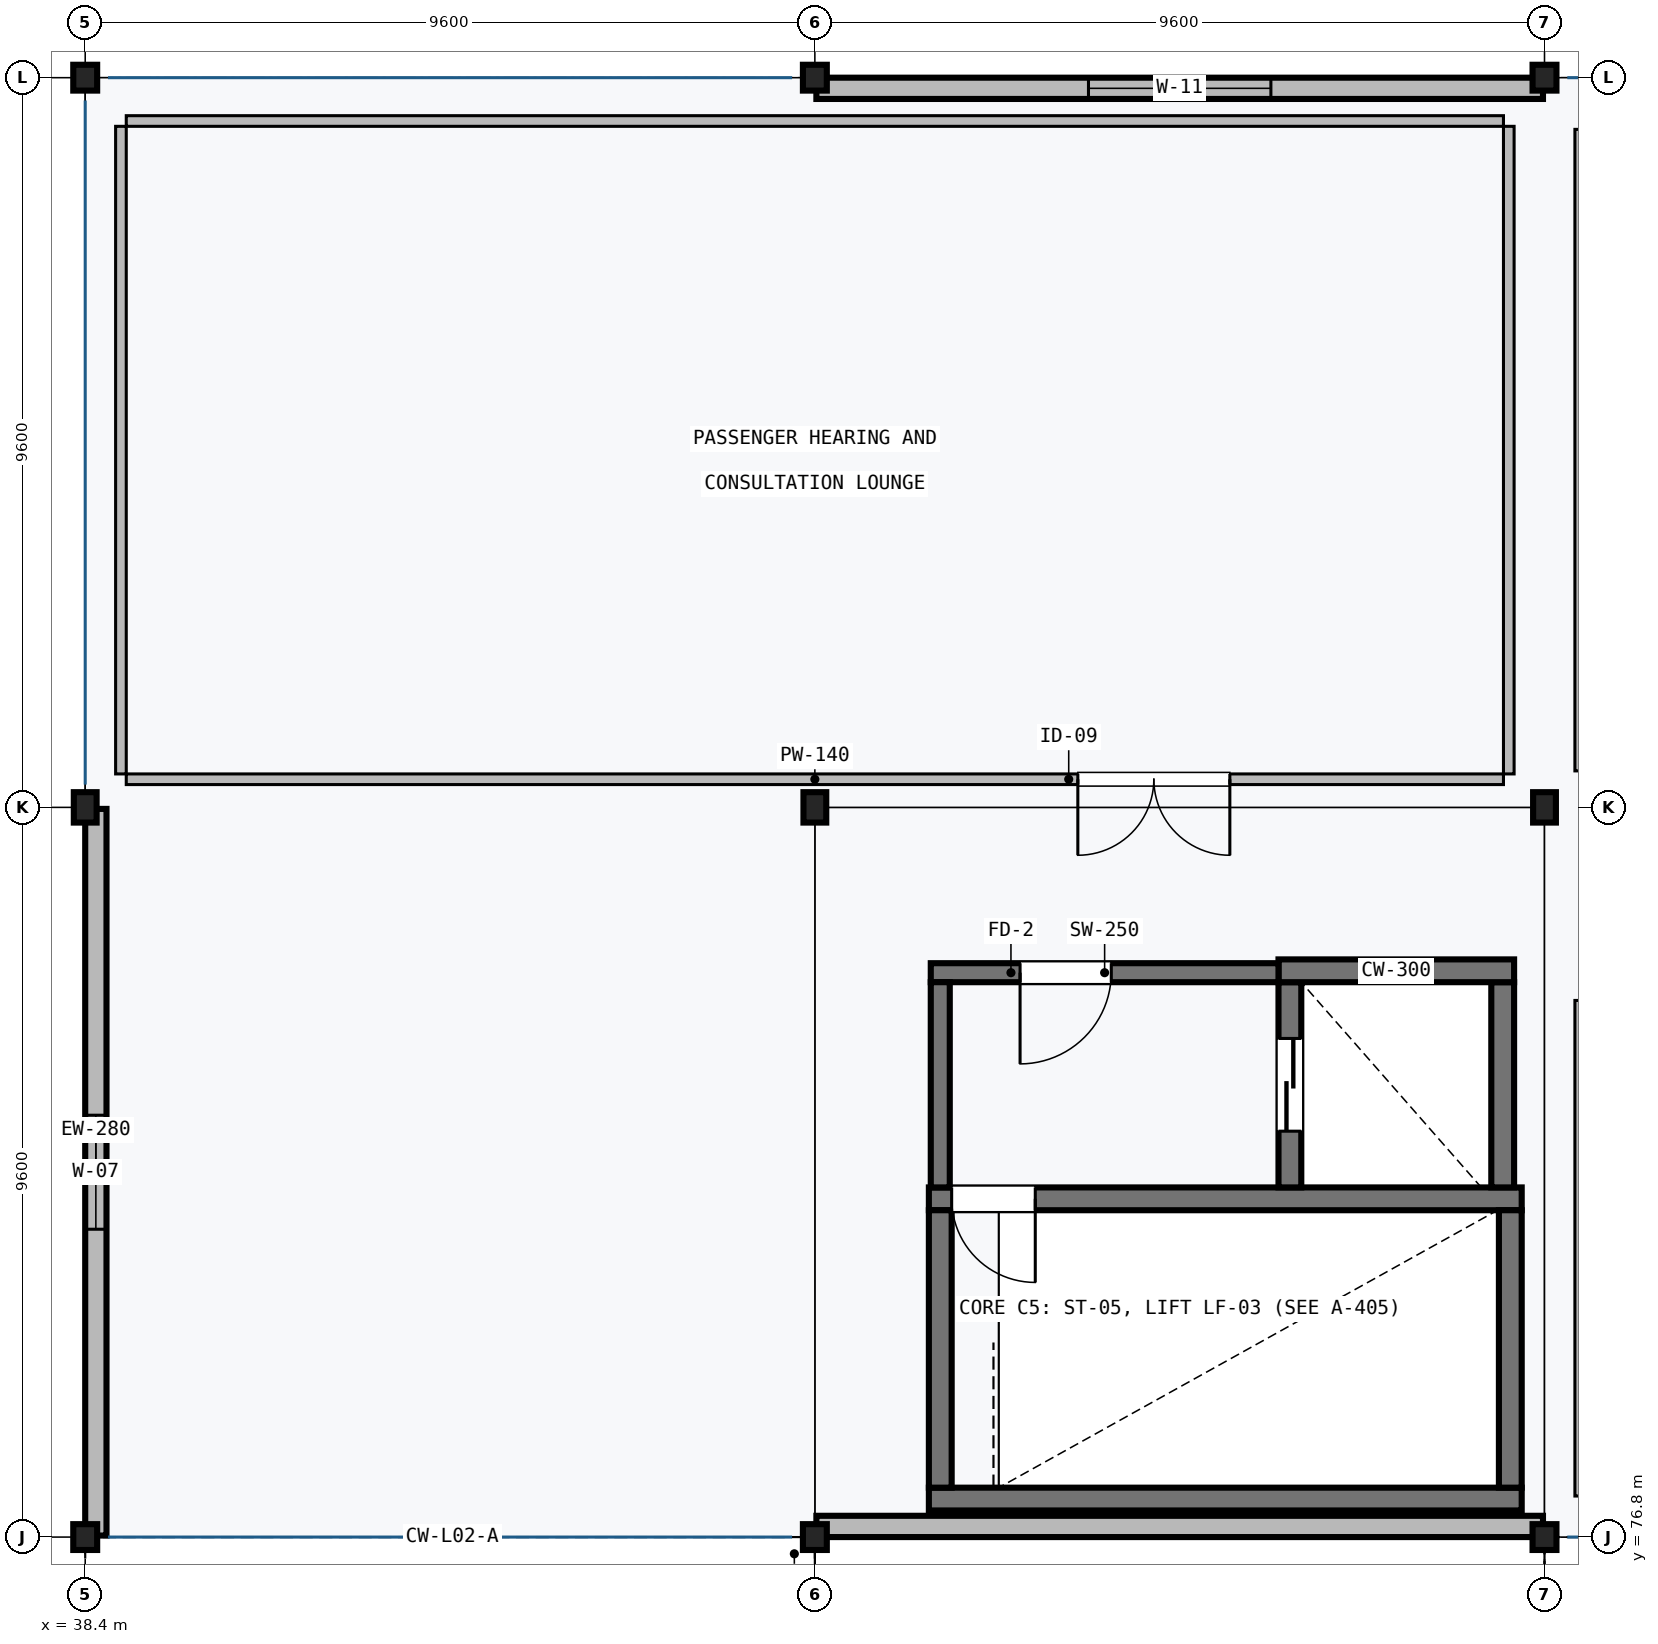
"""IFC4 building model, lengths in metres.
Left out: names, types, materials, properties, quantities, classifications, styles, units other than length and angle.
Written with IfcOpenShell. Run it as: python <this file> out.ifc"""

import sys

from ifc_helpers import new_model, si_unit, direction, frame, frame_2d, origin, origin_2d, place, context, subcontext, project, spatial, rectangle, i_section, extrude, element, fill, save


model = new_model("IFC4")
c1 = context("Model", 3, precision=1e-05, world=origin(), true_north=direction((0.0, 1.0)))
c2 = subcontext(c1, "Body", "Model", "MODEL_VIEW")
j1 = project(units=[si_unit("LENGTHUNIT", "METRE"), si_unit("PLANEANGLEUNIT", "RADIAN")], contexts=[c1])
p1 = place(None, origin())
s1 = spatial("IfcSite", under=j1, at=p1, CompositionType="ELEMENT")
p2 = place(p1, origin())
s2 = spatial("IfcBuilding", under=s1, at=p2, CompositionType="ELEMENT")
p3 = place(p2, frame((0.0, 0.0, 10.5)))
s3 = spatial("IfcBuildingStorey", under=s2, at=p3, CompositionType="ELEMENT", Elevation=10.5)
p4 = place(p3, frame((38.4, 76.8, 0.0), z_axis=(0.0, 0.0, 1.0), x_axis=(1.0, 0.0, 0.0)))
e1 = element("IfcColumn", 1, at=p4, inside=s3, PredefinedType="COLUMN", context=c2, shape_type="SweptSolid", body=[
    extrude(i_section(OverallWidth=0.314, OverallDepth=0.34, WebThickness=0.019, FlangeThickness=0.031, FilletRadius=0.015, at=origin_2d()), origin(), (0.0, 0.0, 1.0), 3.95),
])
p5 = place(p3, frame((38.4, 86.4, 0.0), z_axis=(0.0, 0.0, 1.0), x_axis=(1.0, 0.0, 0.0)))
e2 = element("IfcColumn", 2, at=p5, inside=s3, PredefinedType="COLUMN", context=c2, shape_type="SweptSolid", body=[
    extrude(i_section(OverallWidth=0.3, OverallDepth=0.4, WebThickness=0.013, FlangeThickness=0.024, FilletRadius=0.027, at=origin_2d()), origin(), (0.0, 0.0, 1.0), 3.95),
])
for number, where, z_axis, x_axis in (
    (3, (38.4, 96.0, 0.0), (0.0, 0.0, 1.0), (1.0, 0.0, 0.0)),
    (4, (48.0, 76.8, 0.0), (0.0, 0.0, 1.0), (1.0, 0.0, 0.0)),
):
    element("IfcColumn", number, at=place(p3, frame(where, z_axis=z_axis, x_axis=x_axis)), inside=s3, PredefinedType="COLUMN", context=c2, shape_type="SweptSolid", body=[
        extrude(i_section(OverallWidth=0.314, OverallDepth=0.34, WebThickness=0.019, FlangeThickness=0.031, FilletRadius=0.015, at=origin_2d()), origin(), (0.0, 0.0, 1.0), 3.95),
    ])
p6 = place(p3, frame((48.0, 86.4, 0.0), z_axis=(0.0, 0.0, 1.0), x_axis=(1.0, 0.0, 0.0)))
e5 = element("IfcColumn", 5, at=p6, inside=s3, PredefinedType="COLUMN", context=c2, shape_type="SweptSolid", body=[
    extrude(i_section(OverallWidth=0.3, OverallDepth=0.4, WebThickness=0.013, FlangeThickness=0.024, FilletRadius=0.027, at=origin_2d()), origin(), (0.0, 0.0, 1.0), 3.95),
])
for number, where, z_axis, x_axis in (
    (6, (48.0, 96.0, 0.0), (0.0, 0.0, 1.0), (1.0, 0.0, 0.0)),
    (7, (57.6, 76.8, 0.0), (0.0, 0.0, 1.0), (1.0, 0.0, 0.0)),
):
    element("IfcColumn", number, at=place(p3, frame(where, z_axis=z_axis, x_axis=x_axis)), inside=s3, PredefinedType="COLUMN", context=c2, shape_type="SweptSolid", body=[
        extrude(i_section(OverallWidth=0.314, OverallDepth=0.34, WebThickness=0.019, FlangeThickness=0.031, FilletRadius=0.015, at=origin_2d()), origin(), (0.0, 0.0, 1.0), 3.95),
    ])
p7 = place(p3, frame((57.6, 86.4, 0.0), z_axis=(0.0, 0.0, 1.0), x_axis=(1.0, 0.0, 0.0)))
e8 = element("IfcColumn", 8, at=p7, inside=s3, PredefinedType="COLUMN", context=c2, shape_type="SweptSolid", body=[
    extrude(i_section(OverallWidth=0.3, OverallDepth=0.4, WebThickness=0.013, FlangeThickness=0.024, FilletRadius=0.027, at=origin_2d()), origin(), (0.0, 0.0, 1.0), 3.95),
])
p8 = place(p3, frame((57.6, 96.0, 0.0), z_axis=(0.0, 0.0, 1.0), x_axis=(1.0, 0.0, 0.0)))
e9 = element("IfcColumn", 9, at=p8, inside=s3, PredefinedType="COLUMN", context=c2, shape_type="SweptSolid", body=[
    extrude(i_section(OverallWidth=0.314, OverallDepth=0.34, WebThickness=0.019, FlangeThickness=0.031, FilletRadius=0.015, at=origin_2d()), origin(), (0.0, 0.0, 1.0), 3.95),
])
p9 = place(p3, frame((49.5, 77.3, 0.0), z_axis=(0.0, 0.0, 1.0), x_axis=(1.0, 0.0, 0.0)))
e10 = element("IfcWall", 10, at=p9, inside=s3, PredefinedType="SHEAR", context=c2, shape_type="SweptSolid", body=[
    extrude(rectangle(XDim=7.8, YDim=0.3, at=frame_2d((3.9, 0.0))), origin(), (0.0, 0.0, 1.0), 3.95),
])
p10 = place(p3, frame((57.3, 81.25, 0.0), z_axis=(0.0, 0.0, 1.0), x_axis=(-1.0, 0.0, 0.0)))
e11 = element("IfcWall", 11, at=p10, inside=s3, PredefinedType="SHEAR", context=c2, shape_type="SweptSolid", body=[
    extrude(rectangle(XDim=7.8, YDim=0.3, at=frame_2d((3.9, 0.0))), origin(), (0.0, 0.0, 1.0), 4.2),
])
p11 = place(p10, frame((6.4, 0.0, 0.0)))
e12 = element("IfcOpeningElement", 12, at=p11, cuts=e11, PredefinedType="OPENING", context=c2, shape_type="SweptSolid", body=[
    extrude(rectangle(XDim=1.1, YDim=2.15, at=frame_2d((0.55, 1.075))), frame((0.0, 0.16, 0.0), z_axis=(0.0, -1.0, 0.0), x_axis=(1.0, 0.0, 0.0)), (0.0, 0.0, 1.0), 0.32),
])
for number, where, z_axis, x_axis in (
    (13, (49.65, 77.45, 0.0), (0.0, 0.0, 1.0), (0.0, 1.0, 0.0)),
    (14, (57.15, 81.1, 0.0), (0.0, 0.0, 1.0), (0.0, -1.0, 0.0)),
):
    element("IfcWall", number, at=place(p3, frame(where, z_axis=z_axis, x_axis=x_axis)), inside=s3, PredefinedType="SHEAR", context=c2, shape_type="SweptSolid", body=[
        extrude(rectangle(XDim=3.65, YDim=0.3, at=frame_2d((1.825, 0.0))), origin(), (0.0, 0.0, 1.0), 3.95),
    ])
p12 = place(p3, frame((54.25, 84.1, 0.0), z_axis=(0.0, 0.0, 1.0), x_axis=(0.0, -1.0, 0.0)))
e15 = element("IfcWall", 15, at=p12, inside=s3, PredefinedType="SHEAR", context=c2, shape_type="SweptSolid", body=[
    extrude(rectangle(XDim=2.7, YDim=0.3, at=frame_2d((1.35, 0.0))), origin(), (0.0, 0.0, 1.0), 4.2),
])
p13 = place(p12, frame((0.74, 0.0, 0.0)))
e16 = element("IfcOpeningElement", 16, at=p13, cuts=e15, PredefinedType="OPENING", context=c2, shape_type="SweptSolid", body=[
    extrude(rectangle(XDim=1.22, YDim=2.15, at=frame_2d((0.61, 1.075))), frame((0.0, 0.16, 0.0), z_axis=(0.0, -1.0, 0.0), x_axis=(1.0, 0.0, 0.0)), (0.0, 0.0, 1.0), 0.32),
])
p14 = place(p3, frame((57.05, 81.4, 0.0), z_axis=(0.0, 0.0, 1.0), x_axis=(0.0, 1.0, 0.0)))
e17 = element("IfcWall", 17, at=p14, inside=s3, PredefinedType="SHEAR", context=c2, shape_type="SweptSolid", body=[
    extrude(rectangle(XDim=2.7, YDim=0.3, at=frame_2d((1.35, 0.0))), origin(), (0.0, 0.0, 1.0), 4.2),
])
p15 = place(p3, frame((54.1, 84.25, 0.0), z_axis=(0.0, 0.0, 1.0), x_axis=(1.0, 0.0, 0.0)))
e18 = element("IfcWall", 18, at=p15, inside=s3, PredefinedType="SHEAR", context=c2, shape_type="SweptSolid", body=[
    extrude(rectangle(XDim=3.1, YDim=0.3, at=frame_2d((1.55, 0.0))), origin(), (0.0, 0.0, 1.0), 4.2),
])
p16 = place(p3, frame((54.1, 84.225, 0.0), z_axis=(0.0, 0.0, 1.0), x_axis=(-1.0, 0.0, 0.0)))
e19 = element("IfcWall", 19, at=p16, inside=s3, PredefinedType="SHEAR", context=c2, shape_type="SweptSolid", body=[
    extrude(rectangle(XDim=4.575, YDim=0.25, at=frame_2d((2.288, 0.0))), origin(), (0.0, 0.0, 1.0), 3.95),
])
p17 = place(p16, frame((2.2, 0.0, 0.0)))
e20 = element("IfcOpeningElement", 20, at=p17, cuts=e19, PredefinedType="OPENING", context=c2, shape_type="SweptSolid", body=[
    extrude(rectangle(XDim=1.2, YDim=2.15, at=frame_2d((0.6, 1.075))), frame((0.0, 0.135, 0.0), z_axis=(0.0, -1.0, 0.0), x_axis=(1.0, 0.0, 0.0)), (0.0, 0.0, 1.0), 0.27),
])
p18 = place(p3, frame((49.65, 81.4, 0.0), z_axis=(0.0, 0.0, 1.0), x_axis=(0.0, 1.0, 0.0)))
e21 = element("IfcWall", 21, at=p18, inside=s3, PredefinedType="SHEAR", context=c2, shape_type="SweptSolid", body=[
    extrude(rectangle(XDim=2.7, YDim=0.25, at=frame_2d((1.35, 0.0))), origin(), (0.0, 0.0, 1.0), 3.95),
])
p19 = place(p3, frame((38.54, 76.82, 0.0), z_axis=(0.0, 0.0, 1.0), x_axis=(0.0, 1.0, 0.0)))
e22 = element("IfcWall", 22, at=p19, inside=s3, PredefinedType="SOLIDWALL", context=c2, shape_type="SweptSolid", body=[
    extrude(rectangle(XDim=9.56, YDim=0.28, at=frame_2d((4.78, 0.0))), origin(), (0.0, 0.0, 1.0), 3.493),
])
p20 = place(p19, frame((4.03, 0.0, 0.9)))
e23 = element("IfcOpeningElement", 23, at=p20, cuts=e22, PredefinedType="OPENING", context=c2, shape_type="SweptSolid", body=[
    extrude(rectangle(XDim=1.5, YDim=1.5, at=frame_2d((0.75, 0.75))), frame((0.0, 0.15, 0.0), z_axis=(0.0, -1.0, 0.0), x_axis=(1.0, 0.0, 0.0)), (0.0, 0.0, 1.0), 0.3),
])
p21 = place(p3, frame((57.58, 76.94, 0.0), z_axis=(0.0, 0.0, 1.0), x_axis=(-1.0, 0.0, 0.0)))
e24 = element("IfcWall", 24, at=p21, inside=s3, PredefinedType="SOLIDWALL", context=c2, shape_type="SweptSolid", body=[
    extrude(rectangle(XDim=9.56, YDim=0.28, at=frame_2d((4.78, 0.0))), origin(), (0.0, 0.0, 1.0), 3.66),
])
p22 = place(p3, frame((48.02, 95.86, 0.0), z_axis=(0.0, 0.0, 1.0), x_axis=(1.0, 0.0, 0.0)))
e25 = element("IfcWall", 25, at=p22, inside=s3, PredefinedType="SOLIDWALL", context=c2, shape_type="SweptSolid", body=[
    extrude(rectangle(XDim=9.56, YDim=0.28, at=frame_2d((4.78, 0.0))), origin(), (0.0, 0.0, 1.0), 3.66),
])
p23 = place(p22, frame((3.58, 0.0, 1.3)))
e26 = element("IfcOpeningElement", 26, at=p23, cuts=e25, PredefinedType="OPENING", context=c2, shape_type="SweptSolid", body=[
    extrude(rectangle(XDim=2.4, YDim=1.05, at=frame_2d((1.2, 0.525))), frame((0.0, 0.15, 0.0), z_axis=(0.0, -1.0, 0.0), x_axis=(1.0, 0.0, 0.0)), (0.0, 0.0, 1.0), 0.3),
])
p24 = place(p3, frame((57.06, 86.77, 0.0), z_axis=(0.0, 0.0, 1.0), x_axis=(-1.0, 0.0, 0.0)))
e27 = element("IfcWall", 27, at=p24, inside=s3, PredefinedType="PARTITIONING", context=c2, shape_type="SweptSolid", body=[
    extrude(rectangle(XDim=18.12, YDim=0.14, at=frame_2d((9.06, 0.0))), origin(), (0.0, 0.0, 1.0), 3.483),
])
p25 = place(p24, frame((3.6, 0.0, 0.0)))
e28 = element("IfcOpeningElement", 28, at=p25, cuts=e27, PredefinedType="OPENING", context=c2, shape_type="SweptSolid", body=[
    extrude(rectangle(XDim=2.0, YDim=2.4, at=frame_2d((1.0, 1.2))), frame((0.0, 0.08, 0.0), z_axis=(0.0, -1.0, 0.0), x_axis=(1.0, 0.0, 0.0)), (0.0, 0.0, 1.0), 0.16),
])
p26 = place(p3, frame((38.94, 95.43, 0.0), z_axis=(0.0, 0.0, 1.0), x_axis=(1.0, 0.0, 0.0)))
e29 = element("IfcWall", 29, at=p26, inside=s3, PredefinedType="PARTITIONING", context=c2, shape_type="SweptSolid", body=[
    extrude(rectangle(XDim=18.12, YDim=0.14, at=frame_2d((9.06, 0.0))), origin(), (0.0, 0.0, 1.0), 3.483),
])
for number, where, z_axis, x_axis in (
    (30, (38.87, 86.84, 0.0), (0.0, 0.0, 1.0), (0.0, 1.0, 0.0)),
    (31, (57.13, 95.36, 0.0), (0.0, 0.0, 1.0), (0.0, -1.0, 0.0)),
):
    element("IfcWall", number, at=place(p3, frame(where, z_axis=z_axis, x_axis=x_axis)), inside=s3, PredefinedType="PARTITIONING", context=c2, shape_type="SweptSolid", body=[
        extrude(rectangle(XDim=8.52, YDim=0.14, at=frame_2d((4.26, 0.0))), origin(), (0.0, 0.0, 1.0), 3.59),
    ])
p27 = place(p3, frame((58.07, 77.34, 0.0), z_axis=(0.0, 0.0, 1.0), x_axis=(0.0, 1.0, 0.0)))
e32 = element("IfcWall", 32, at=p27, inside=s3, PredefinedType="PARTITIONING", context=c2, shape_type="SweptSolid", body=[
    extrude(rectangle(XDim=6.52, YDim=0.14, at=frame_2d((3.26, 0.0))), origin(), (0.0, 0.0, 1.0), 3.59),
])
p28 = place(p3, frame((58.09, 86.88, 0.0), z_axis=(0.0, 0.0, 1.0), x_axis=(0.0, 1.0, 0.0)))
e33 = element("IfcWall", 33, at=p28, inside=s3, PredefinedType="PARTITIONING", context=c2, shape_type="SweptSolid", body=[
    extrude(rectangle(XDim=8.44, YDim=0.18, at=frame_2d((4.22, 0.0))), origin(), (0.0, 0.0, 1.0), 3.59),
])
p29 = place(p11, origin())
e34 = element("IfcDoor", 34, at=p29, inside=s3, OperationType="SINGLE_SWING_LEFT", PredefinedType="DOOR", context=c2, shape_type="SweptSolid", body=[
    extrude(rectangle(XDim=1.1, YDim=2.15, at=frame_2d((0.55, 1.075))), frame((0.0, 0.025, 0.0), z_axis=(0.0, -1.0, 0.0), x_axis=(1.0, 0.0, 0.0)), (0.0, 0.0, 1.0), 0.05),
])
fill(e12, e34)
p30 = place(p13, frame((1.22, 0.0, 0.0), z_axis=(0.0, 0.0, 1.0), x_axis=(-1.0, 0.0, 0.0)))
e35 = element("IfcDoor", 35, at=p30, inside=s3, OperationType="DOUBLE_DOOR_SLIDING", PredefinedType="DOOR", context=c2, shape_type="SweptSolid", body=[
    extrude(rectangle(XDim=1.22, YDim=2.15, at=frame_2d((0.61, 1.075))), frame((0.0, 0.025, 0.0), z_axis=(0.0, -1.0, 0.0), x_axis=(1.0, 0.0, 0.0)), (0.0, 0.0, 1.0), 0.05),
])
fill(e16, e35)
p31 = place(p17, origin())
e36 = element("IfcDoor", 36, at=p31, inside=s3, OperationType="SINGLE_SWING_RIGHT", PredefinedType="DOOR", context=c2, shape_type="SweptSolid", body=[
    extrude(rectangle(XDim=1.2, YDim=2.15, at=frame_2d((0.6, 1.075))), frame((0.0, 0.025, 0.0), z_axis=(0.0, -1.0, 0.0), x_axis=(1.0, 0.0, 0.0)), (0.0, 0.0, 1.0), 0.05),
])
fill(e20, e36)
p32 = place(p20, origin())
e37 = element("IfcWindow", 37, at=p32, inside=s3, PartitioningType="SINGLE_PANEL", PredefinedType="WINDOW", context=c2, shape_type="SweptSolid", body=[
    extrude(rectangle(XDim=1.5, YDim=1.5, at=frame_2d((0.75, 0.75))), frame((0.0, 0.03, 0.0), z_axis=(0.0, -1.0, 0.0), x_axis=(1.0, 0.0, 0.0)), (0.0, 0.0, 1.0), 0.06),
])
fill(e23, e37)
p33 = place(p23, origin())
e38 = element("IfcWindow", 38, at=p33, inside=s3, PartitioningType="SINGLE_PANEL", PredefinedType="WINDOW", context=c2, shape_type="SweptSolid", body=[
    extrude(rectangle(XDim=2.4, YDim=1.05, at=frame_2d((1.2, 0.525))), frame((0.0, 0.03, 0.0), z_axis=(0.0, -1.0, 0.0), x_axis=(1.0, 0.0, 0.0)), (0.0, 0.0, 1.0), 0.06),
])
fill(e26, e38)
p34 = place(p25, origin())
e39 = element("IfcDoor", 39, at=p34, inside=s3, OperationType="DOUBLE_DOOR_SINGLE_SWING", PredefinedType="DOOR", context=c2, shape_type="SweptSolid", body=[
    extrude(rectangle(XDim=2.0, YDim=2.4, at=frame_2d((1.0, 1.2))), frame((0.0, 0.025, 0.0), z_axis=(0.0, -1.0, 0.0), x_axis=(1.0, 0.0, 0.0)), (0.0, 0.0, 1.0), 0.05),
])
fill(e28, e39)
save(model, sys.argv[1])
